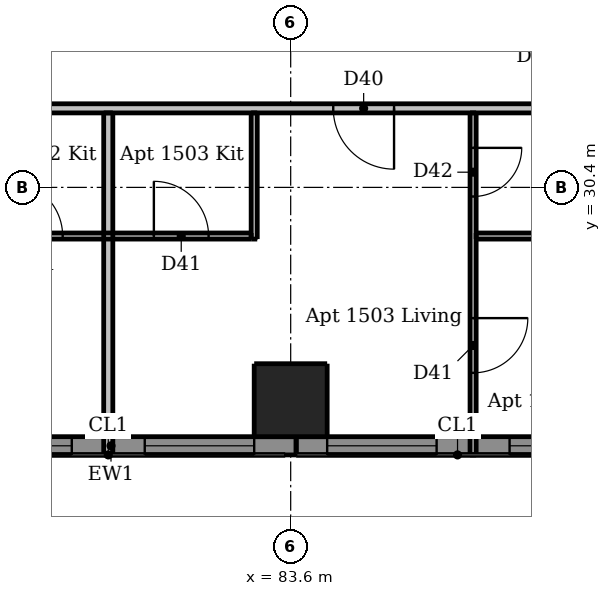
"""IFC4 building model, lengths in metres.
Left out: names, types, materials, properties, quantities, classifications, styles, units other than length and angle.
Written with IfcOpenShell. Run it as: python <this file> out.ifc"""

import sys

from ifc_helpers import new_model, si_unit, direction, frame, frame_2d, origin, origin_2d, place, context, subcontext, project, spatial, rectangle, extrude, element, fill, save


model = new_model("IFC4")
c1 = context("Model", 3, precision=1e-05, world=origin(), true_north=direction((0.0, 1.0)))
c2 = subcontext(c1, "Body", "Model", "MODEL_VIEW")
j1 = project(units=[si_unit("LENGTHUNIT", "METRE"), si_unit("PLANEANGLEUNIT", "RADIAN")], contexts=[c1])
p1 = place(None, origin())
s1 = spatial("IfcSite", under=j1, at=p1, CompositionType="ELEMENT")
p2 = place(p1, origin())
s2 = spatial("IfcBuilding", under=s1, at=p2, CompositionType="ELEMENT")
p3 = place(p2, frame((0.0, 0.0, 56.5)))
s3 = spatial("IfcBuildingStorey", under=s2, at=p3, CompositionType="ELEMENT", Elevation=56.5)
p4 = place(p3, frame((83.6, 26.9, 0.0), z_axis=(0.0, 0.0, 1.0), x_axis=(1.0, 0.0, 0.0)))
e1 = element("IfcColumn", 1, at=p4, inside=s3, PredefinedType="COLUMN", context=c2, shape_type="SweptSolid", body=[
    extrude(rectangle(XDim=1.2, YDim=1.2, at=origin_2d()), origin(), (0.0, 0.0, 1.0), 3.05),
])
p5 = place(p3, frame((77.6, 26.15, 0.0), z_axis=(0.0, 0.0, 1.0), x_axis=(1.0, 0.0, 0.0)))
e2 = element("IfcWall", 2, at=p5, inside=s3, PredefinedType="SOLIDWALL", context=c2, shape_type="SweptSolid", body=[
    extrude(rectangle(XDim=6.09, YDim=0.3, at=frame_2d((3.045, 0.0))), origin(), (0.0, 0.0, 1.0), 3.05),
])
p6 = place(p5, frame((0.6, 0.0, 0.15)))
e3 = element("IfcOpeningElement", 3, at=p6, cuts=e2, PredefinedType="OPENING", context=c2, shape_type="SweptSolid", body=[
    extrude(rectangle(XDim=1.8, YDim=2.1, at=frame_2d((0.9, 1.05))), frame((0.0, 0.16, 0.0), z_axis=(0.0, -1.0, 0.0), x_axis=(1.0, 0.0, 0.0)), (0.0, 0.0, 1.0), 0.32),
])
p7 = place(p5, frame((3.6, 0.0, 0.15)))
e4 = element("IfcOpeningElement", 4, at=p7, cuts=e2, PredefinedType="OPENING", context=c2, shape_type="SweptSolid", body=[
    extrude(rectangle(XDim=1.8, YDim=2.1, at=frame_2d((0.9, 1.05))), frame((0.0, 0.16, 0.0), z_axis=(0.0, -1.0, 0.0), x_axis=(1.0, 0.0, 0.0)), (0.0, 0.0, 1.0), 0.32),
])
p8 = place(p3, frame((83.69, 26.15, 0.0), z_axis=(0.0, 0.0, 1.0), x_axis=(1.0, 0.0, 0.0)))
e5 = element("IfcWall", 5, at=p8, inside=s3, PredefinedType="SOLIDWALL", context=c2, shape_type="SweptSolid", body=[
    extrude(rectangle(XDim=5.8, YDim=0.3, at=frame_2d((2.9, 0.0))), origin(), (0.0, 0.0, 1.0), 3.05),
])
p9 = place(p8, frame((0.51, 0.0, 0.15)))
e6 = element("IfcOpeningElement", 6, at=p9, cuts=e5, PredefinedType="OPENING", context=c2, shape_type="SweptSolid", body=[
    extrude(rectangle(XDim=1.8, YDim=2.1, at=frame_2d((0.9, 1.05))), frame((0.0, 0.16, 0.0), z_axis=(0.0, -1.0, 0.0), x_axis=(1.0, 0.0, 0.0)), (0.0, 0.0, 1.0), 0.32),
])
p10 = place(p8, frame((3.51, 0.0, 0.15)))
e7 = element("IfcOpeningElement", 7, at=p10, cuts=e5, PredefinedType="OPENING", context=c2, shape_type="SweptSolid", body=[
    extrude(rectangle(XDim=1.8, YDim=2.1, at=frame_2d((0.9, 1.05))), frame((0.0, 0.16, 0.0), z_axis=(0.0, -1.0, 0.0), x_axis=(1.0, 0.0, 0.0)), (0.0, 0.0, 1.0), 0.32),
])
p11 = place(p3, frame((83.0, 29.55, 0.0), z_axis=(0.0, 0.0, 1.0), x_axis=(0.0, 1.0, 0.0)))
e8 = element("IfcWall", 8, at=p11, inside=s3, PredefinedType="PARTITIONING", context=c2, shape_type="SweptSolid", body=[
    extrude(rectangle(XDim=2.075, YDim=0.1, at=frame_2d((1.038, 0.0))), origin(), (0.0, 0.0, 1.0), 3.05),
])
p12 = place(p3, frame((86.6, 31.625, 0.0), z_axis=(0.0, 0.0, 1.0), x_axis=(0.0, -1.0, 0.0)))
e9 = element("IfcWall", 9, at=p12, inside=s3, PredefinedType="PARTITIONING", context=c2, shape_type="SweptSolid", body=[
    extrude(rectangle(XDim=5.625, YDim=0.1, at=frame_2d((2.812, 0.0))), origin(), (0.0, 0.0, 1.0), 3.05),
])
p13 = place(p12, frame((3.375, 0.0, 0.0)))
e10 = element("IfcOpeningElement", 10, at=p13, cuts=e9, PredefinedType="OPENING", context=c2, shape_type="SweptSolid", body=[
    extrude(rectangle(XDim=0.9, YDim=2.1, at=frame_2d((0.45, 1.05))), frame((0.0, 0.06, 0.0), z_axis=(0.0, -1.0, 0.0), x_axis=(1.0, 0.0, 0.0)), (0.0, 0.0, 1.0), 0.12),
])
p14 = place(p12, frame((0.575, 0.0, 0.0)))
e11 = element("IfcOpeningElement", 11, at=p14, cuts=e9, PredefinedType="OPENING", context=c2, shape_type="SweptSolid", body=[
    extrude(rectangle(XDim=0.8, YDim=2.1, at=frame_2d((0.4, 1.05))), frame((0.0, 0.06, 0.0), z_axis=(0.0, -1.0, 0.0), x_axis=(1.0, 0.0, 0.0)), (0.0, 0.0, 1.0), 0.12),
])
p15 = place(p3, frame((78.25, 29.6, 0.0), z_axis=(0.0, 0.0, 1.0), x_axis=(1.0, 0.0, 0.0)))
e12 = element("IfcWall", 12, at=p15, inside=s3, PredefinedType="PARTITIONING", context=c2, shape_type="SweptSolid", body=[
    extrude(rectangle(XDim=4.7, YDim=0.1, at=frame_2d((2.35, 0.0))), origin(), (0.0, 0.0, 1.0), 3.05),
])
p16 = place(p15, frame((0.7, 0.0, 0.0)))
e13 = element("IfcOpeningElement", 13, at=p16, cuts=e12, PredefinedType="OPENING", context=c2, shape_type="SweptSolid", body=[
    extrude(rectangle(XDim=0.9, YDim=2.1, at=frame_2d((0.45, 1.05))), frame((0.0, 0.06, 0.0), z_axis=(0.0, -1.0, 0.0), x_axis=(1.0, 0.0, 0.0)), (0.0, 0.0, 1.0), 0.12),
])
p17 = place(p15, frame((3.1, 0.0, 0.0)))
e14 = element("IfcOpeningElement", 14, at=p17, cuts=e12, PredefinedType="OPENING", context=c2, shape_type="SweptSolid", body=[
    extrude(rectangle(XDim=0.9, YDim=2.1, at=frame_2d((0.45, 1.05))), frame((0.0, 0.06, 0.0), z_axis=(0.0, -1.0, 0.0), x_axis=(1.0, 0.0, 0.0)), (0.0, 0.0, 1.0), 0.12),
])
p18 = place(p3, frame((86.65, 29.6, 0.0), z_axis=(0.0, 0.0, 1.0), x_axis=(1.0, 0.0, 0.0)))
e15 = element("IfcWall", 15, at=p18, inside=s3, PredefinedType="PARTITIONING", context=c2, shape_type="SweptSolid", body=[
    extrude(rectangle(XDim=2.875, YDim=0.1, at=frame_2d((1.438, 0.0))), origin(), (0.0, 0.0, 1.0), 3.05),
])
p19 = place(p3, frame((80.6, 26.0, 0.0), z_axis=(0.0, 0.0, 1.0), x_axis=(0.0, 1.0, 0.0)))
e16 = element("IfcWall", 16, at=p19, inside=s3, PredefinedType="PARTITIONING", context=c2, shape_type="SweptSolid", body=[
    extrude(rectangle(XDim=5.625, YDim=0.15, at=frame_2d((2.812, 0.0))), origin(), (0.0, 0.0, 1.0), 3.05),
])
p20 = place(p3, frame((89.525, 31.7, 0.0), z_axis=(0.0, 0.0, 1.0), x_axis=(-1.0, 0.0, 0.0)))
e17 = element("IfcWall", 17, at=p20, inside=s3, PredefinedType="PARTITIONING", context=c2, shape_type="SweptSolid", body=[
    extrude(rectangle(XDim=28.75, YDim=0.15, at=frame_2d((14.375, 0.0))), origin(), (0.0, 0.0, 1.0), 3.05),
])
p21 = place(p20, frame((27.375, 0.0, 0.0)))
e18 = element("IfcOpeningElement", 18, at=p21, cuts=e17, PredefinedType="OPENING", context=c2, shape_type="SweptSolid", body=[
    extrude(rectangle(XDim=1.0, YDim=2.1, at=frame_2d((0.5, 1.05))), frame((0.0, 0.085, 0.0), z_axis=(0.0, -1.0, 0.0), x_axis=(1.0, 0.0, 0.0)), (0.0, 0.0, 1.0), 0.17),
])
p22 = place(p20, frame((12.625, 0.0, 0.0)))
e19 = element("IfcOpeningElement", 19, at=p22, cuts=e17, PredefinedType="OPENING", context=c2, shape_type="SweptSolid", body=[
    extrude(rectangle(XDim=1.0, YDim=2.1, at=frame_2d((0.5, 1.05))), frame((0.0, 0.085, 0.0), z_axis=(0.0, -1.0, 0.0), x_axis=(1.0, 0.0, 0.0)), (0.0, 0.0, 1.0), 0.17),
])
p23 = place(p20, frame((4.225, 0.0, 0.0)))
e20 = element("IfcOpeningElement", 20, at=p23, cuts=e17, PredefinedType="OPENING", context=c2, shape_type="SweptSolid", body=[
    extrude(rectangle(XDim=1.0, YDim=2.1, at=frame_2d((0.5, 1.05))), frame((0.0, 0.085, 0.0), z_axis=(0.0, -1.0, 0.0), x_axis=(1.0, 0.0, 0.0)), (0.0, 0.0, 1.0), 0.17),
])
p24 = place(p6, origin())
e21 = element("IfcWindow", 21, at=p24, inside=s3, PartitioningType="DOUBLE_PANEL_VERTICAL", PredefinedType="WINDOW", context=c2, shape_type="SweptSolid", body=[
    extrude(rectangle(XDim=1.8, YDim=2.1, at=frame_2d((0.9, 1.05))), frame((0.0, 0.03, 0.0), z_axis=(0.0, -1.0, 0.0), x_axis=(1.0, 0.0, 0.0)), (0.0, 0.0, 1.0), 0.06),
])
fill(e3, e21)
p25 = place(p7, origin())
e22 = element("IfcWindow", 22, at=p25, inside=s3, PartitioningType="DOUBLE_PANEL_VERTICAL", PredefinedType="WINDOW", context=c2, shape_type="SweptSolid", body=[
    extrude(rectangle(XDim=1.8, YDim=2.1, at=frame_2d((0.9, 1.05))), frame((0.0, 0.03, 0.0), z_axis=(0.0, -1.0, 0.0), x_axis=(1.0, 0.0, 0.0)), (0.0, 0.0, 1.0), 0.06),
])
fill(e4, e22)
p26 = place(p9, origin())
e23 = element("IfcWindow", 23, at=p26, inside=s3, PartitioningType="DOUBLE_PANEL_VERTICAL", PredefinedType="WINDOW", context=c2, shape_type="SweptSolid", body=[
    extrude(rectangle(XDim=1.8, YDim=2.1, at=frame_2d((0.9, 1.05))), frame((0.0, 0.03, 0.0), z_axis=(0.0, -1.0, 0.0), x_axis=(1.0, 0.0, 0.0)), (0.0, 0.0, 1.0), 0.06),
])
fill(e6, e23)
p27 = place(p10, origin())
e24 = element("IfcWindow", 24, at=p27, inside=s3, PartitioningType="DOUBLE_PANEL_VERTICAL", PredefinedType="WINDOW", context=c2, shape_type="SweptSolid", body=[
    extrude(rectangle(XDim=1.8, YDim=2.1, at=frame_2d((0.9, 1.05))), frame((0.0, 0.03, 0.0), z_axis=(0.0, -1.0, 0.0), x_axis=(1.0, 0.0, 0.0)), (0.0, 0.0, 1.0), 0.06),
])
fill(e7, e24)
p28 = place(p16, origin())
e25 = element("IfcDoor", 25, at=p28, inside=s3, OperationType="SINGLE_SWING_LEFT", PredefinedType="DOOR", context=c2, shape_type="SweptSolid", body=[
    extrude(rectangle(XDim=0.9, YDim=2.1, at=frame_2d((0.45, 1.05))), frame((0.0, 0.025, 0.0), z_axis=(0.0, -1.0, 0.0), x_axis=(1.0, 0.0, 0.0)), (0.0, 0.0, 1.0), 0.05),
])
fill(e13, e25)
p29 = place(p23, origin())
e26 = element("IfcDoor", 26, at=p29, inside=s3, OperationType="SINGLE_SWING_LEFT", PredefinedType="DOOR", context=c2, shape_type="SweptSolid", body=[
    extrude(rectangle(XDim=1.0, YDim=2.1, at=frame_2d((0.5, 1.05))), frame((0.0, 0.025, 0.0), z_axis=(0.0, -1.0, 0.0), x_axis=(1.0, 0.0, 0.0)), (0.0, 0.0, 1.0), 0.05),
])
fill(e20, e26)
p30 = place(p17, origin())
e27 = element("IfcDoor", 27, at=p30, inside=s3, OperationType="SINGLE_SWING_LEFT", PredefinedType="DOOR", context=c2, shape_type="SweptSolid", body=[
    extrude(rectangle(XDim=0.9, YDim=2.1, at=frame_2d((0.45, 1.05))), frame((0.0, 0.025, 0.0), z_axis=(0.0, -1.0, 0.0), x_axis=(1.0, 0.0, 0.0)), (0.0, 0.0, 1.0), 0.05),
])
fill(e14, e27)
p31 = place(p13, origin())
e28 = element("IfcDoor", 28, at=p31, inside=s3, OperationType="SINGLE_SWING_LEFT", PredefinedType="DOOR", context=c2, shape_type="SweptSolid", body=[
    extrude(rectangle(XDim=0.9, YDim=2.1, at=frame_2d((0.45, 1.05))), frame((0.0, 0.025, 0.0), z_axis=(0.0, -1.0, 0.0), x_axis=(1.0, 0.0, 0.0)), (0.0, 0.0, 1.0), 0.05),
])
fill(e10, e28)
p32 = place(p14, origin())
e29 = element("IfcDoor", 29, at=p32, inside=s3, OperationType="SINGLE_SWING_LEFT", PredefinedType="DOOR", context=c2, shape_type="SweptSolid", body=[
    extrude(rectangle(XDim=0.8, YDim=2.1, at=frame_2d((0.4, 1.05))), frame((0.0, 0.025, 0.0), z_axis=(0.0, -1.0, 0.0), x_axis=(1.0, 0.0, 0.0)), (0.0, 0.0, 1.0), 0.05),
])
fill(e11, e29)
save(model, sys.argv[1])
